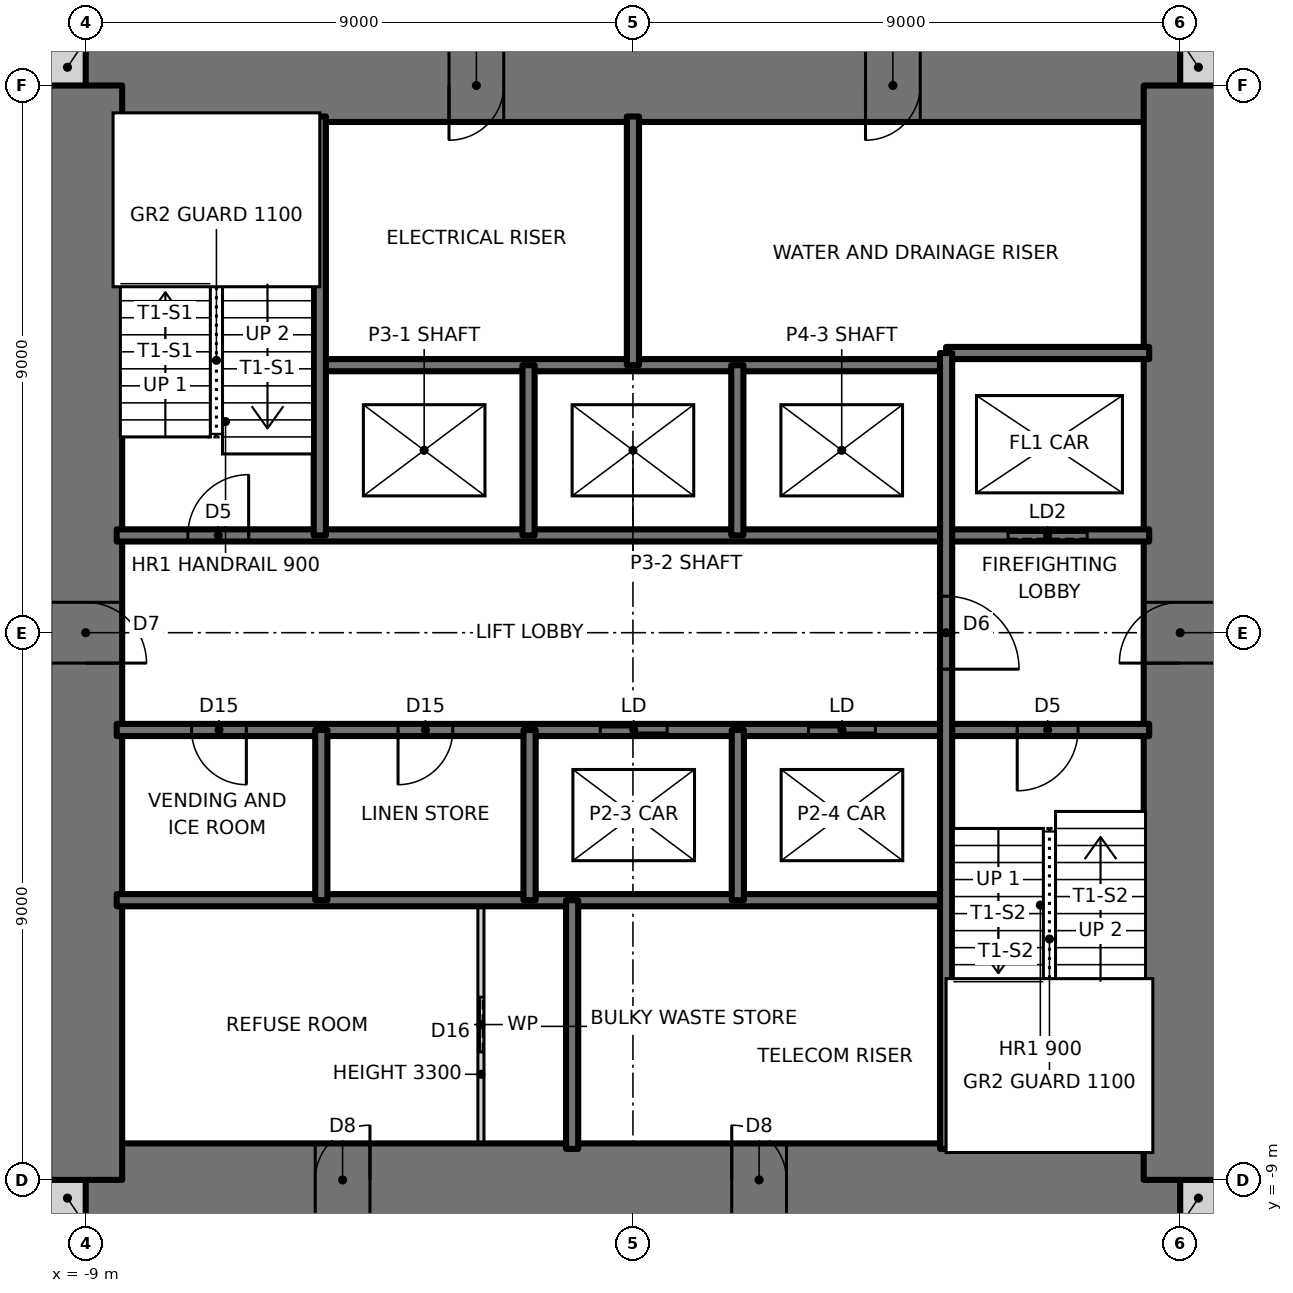
"""IFC4 building model, lengths in metres.
Left out: names, types, materials, properties, quantities, classifications, styles, units other than length and angle.
Written with IfcOpenShell. Run it as: python <this file> out.ifc"""

import sys

from ifc_helpers import new_model, si_unit, direction, frame, frame_2d, origin, place, context, subcontext, project, spatial, rectangle, extrude, element, fill, save


model = new_model("IFC4")
c1 = context("Model", 3, precision=1e-05, world=origin(), true_north=direction((0.0, 1.0)))
c2 = subcontext(c1, "Body", "Model", "MODEL_VIEW")
j1 = project(units=[si_unit("LENGTHUNIT", "METRE"), si_unit("PLANEANGLEUNIT", "RADIAN")], contexts=[c1])
p1 = place(None, origin())
s1 = spatial("IfcSite", under=j1, at=p1, CompositionType="ELEMENT")
p2 = place(p1, origin())
s2 = spatial("IfcBuilding", under=s1, at=p2, CompositionType="ELEMENT")
p3 = place(p2, frame((0.0, 0.0, 87.5)))
s3 = spatial("IfcBuildingStorey", under=s2, at=p3, CompositionType="ELEMENT", Elevation=87.5)
for number, where, z_axis, x_axis in (
    (1, (-9.6, -9.3, 0.0), (0.0, 0.0, 1.0), (1.0, 0.0, 0.0)),
    (2, (9.0, -9.3, 0.0), (0.0, 0.0, 1.0), (1.0, 0.0, 0.0)),
    (3, (9.0, 9.3, 0.0), (0.0, 0.0, 1.0), (1.0, 0.0, 0.0)),
    (4, (-9.6, 9.3, 0.0), (0.0, 0.0, 1.0), (1.0, 0.0, 0.0)),
):
    element("IfcWall", number, at=place(p3, frame(where, z_axis=z_axis, x_axis=x_axis)), inside=s3, PredefinedType="SOLIDWALL", context=c2, shape_type="SweptSolid", body=[
        extrude(rectangle(XDim=0.6, YDim=0.6, at=frame_2d((0.3, 0.0))), origin(), (0.0, 0.0, 1.0), 3.5),
    ])
p4 = place(p3, frame((-9.0, -9.0, 0.0), z_axis=(0.0, 0.0, 1.0), x_axis=(1.0, 0.0, 0.0)))
e5 = element("IfcWall", 5, at=p4, inside=s3, PredefinedType="SHEAR", context=c2, shape_type="SweptSolid", body=[
    extrude(rectangle(XDim=18.0, YDim=1.2, at=frame_2d((9.0, 0.0))), origin(), (0.0, 0.0, 1.0), 3.5),
])
p5 = place(p4, frame((3.775, 0.0, 0.0)))
e6 = element("IfcOpeningElement", 6, at=p5, cuts=e5, PredefinedType="OPENING", context=c2, shape_type="SweptSolid", body=[
    extrude(rectangle(XDim=0.9, YDim=2.1, at=frame_2d((0.45, 1.05))), frame((0.0, 0.61, 0.0), z_axis=(0.0, -1.0, 0.0), x_axis=(1.0, 0.0, 0.0)), (0.0, 0.0, 1.0), 1.22),
])
p6 = place(p4, frame((10.625, 0.0, 0.0)))
e7 = element("IfcOpeningElement", 7, at=p6, cuts=e5, PredefinedType="OPENING", context=c2, shape_type="SweptSolid", body=[
    extrude(rectangle(XDim=0.9, YDim=2.1, at=frame_2d((0.45, 1.05))), frame((0.0, 0.61, 0.0), z_axis=(0.0, -1.0, 0.0), x_axis=(1.0, 0.0, 0.0)), (0.0, 0.0, 1.0), 1.22),
])
p7 = place(p3, frame((9.0, 9.0, 0.0), z_axis=(0.0, 0.0, 1.0), x_axis=(-1.0, 0.0, 0.0)))
e8 = element("IfcWall", 8, at=p7, inside=s3, PredefinedType="SHEAR", context=c2, shape_type="SweptSolid", body=[
    extrude(rectangle(XDim=18.0, YDim=1.2, at=frame_2d((9.0, 0.0))), origin(), (0.0, 0.0, 1.0), 3.5),
])
p8 = place(p7, frame((11.125, 0.0, 0.0)))
e9 = element("IfcOpeningElement", 9, at=p8, cuts=e8, PredefinedType="OPENING", context=c2, shape_type="SweptSolid", body=[
    extrude(rectangle(XDim=0.9, YDim=2.1, at=frame_2d((0.45, 1.05))), frame((0.0, 0.61, 0.0), z_axis=(0.0, -1.0, 0.0), x_axis=(1.0, 0.0, 0.0)), (0.0, 0.0, 1.0), 1.22),
])
p9 = place(p7, frame((4.275, 0.0, 0.0)))
e10 = element("IfcOpeningElement", 10, at=p9, cuts=e8, PredefinedType="OPENING", context=c2, shape_type="SweptSolid", body=[
    extrude(rectangle(XDim=0.9, YDim=2.1, at=frame_2d((0.45, 1.05))), frame((0.0, 0.61, 0.0), z_axis=(0.0, -1.0, 0.0), x_axis=(1.0, 0.0, 0.0)), (0.0, 0.0, 1.0), 1.22),
])
p10 = place(p3, frame((9.0, -9.0, 0.0), z_axis=(0.0, 0.0, 1.0), x_axis=(0.0, 1.0, 0.0)))
e11 = element("IfcWall", 11, at=p10, inside=s3, PredefinedType="SHEAR", context=c2, shape_type="SweptSolid", body=[
    extrude(rectangle(XDim=18.0, YDim=1.2, at=frame_2d((9.0, 0.0))), origin(), (0.0, 0.0, 1.0), 3.5),
])
p11 = place(p10, frame((8.5, 0.0, 0.0)))
e12 = element("IfcOpeningElement", 12, at=p11, cuts=e11, PredefinedType="OPENING", context=c2, shape_type="SweptSolid", body=[
    extrude(rectangle(XDim=1.0, YDim=2.1, at=frame_2d((0.5, 1.05))), frame((0.0, 0.61, 0.0), z_axis=(0.0, -1.0, 0.0), x_axis=(1.0, 0.0, 0.0)), (0.0, 0.0, 1.0), 1.22),
])
p12 = place(p3, frame((-9.0, 9.0, 0.0), z_axis=(0.0, 0.0, 1.0), x_axis=(0.0, -1.0, 0.0)))
e13 = element("IfcWall", 13, at=p12, inside=s3, PredefinedType="SHEAR", context=c2, shape_type="SweptSolid", body=[
    extrude(rectangle(XDim=18.0, YDim=1.2, at=frame_2d((9.0, 0.0))), origin(), (0.0, 0.0, 1.0), 3.5),
])
p13 = place(p12, frame((8.5, 0.0, 0.0)))
e14 = element("IfcOpeningElement", 14, at=p13, cuts=e13, PredefinedType="OPENING", context=c2, shape_type="SweptSolid", body=[
    extrude(rectangle(XDim=1.0, YDim=2.1, at=frame_2d((0.5, 1.05))), frame((0.0, 0.61, 0.0), z_axis=(0.0, -1.0, 0.0), x_axis=(1.0, 0.0, 0.0)), (0.0, 0.0, 1.0), 1.22),
])
p14 = place(p3, frame((-8.49, -4.4, 0.0), z_axis=(0.0, 0.0, 1.0), x_axis=(1.0, 0.0, 0.0)))
e15 = element("IfcWall", 15, at=p14, inside=s3, PredefinedType="SOLIDWALL", context=c2, shape_type="SweptSolid", body=[
    extrude(rectangle(XDim=13.64, YDim=0.2, at=frame_2d((6.82, 0.0))), origin(), (0.0, 0.0, 1.0), 3.5),
])
p15 = place(p3, frame((-8.49, -1.6, 0.0), z_axis=(0.0, 0.0, 1.0), x_axis=(1.0, 0.0, 0.0)))
e16 = element("IfcWall", 16, at=p15, inside=s3, PredefinedType="SOLIDWALL", context=c2, shape_type="SweptSolid", body=[
    extrude(rectangle(XDim=16.98, YDim=0.2, at=frame_2d((8.49, 0.0))), origin(), (0.0, 0.0, 1.0), 3.5),
])
p16 = place(p15, frame((14.81, 0.0, 0.0)))
e17 = element("IfcOpeningElement", 17, at=p16, cuts=e16, PredefinedType="OPENING", context=c2, shape_type="SweptSolid", body=[
    extrude(rectangle(XDim=1.0, YDim=2.1, at=frame_2d((0.5, 1.05))), frame((0.0, 0.11, 0.0), z_axis=(0.0, -1.0, 0.0), x_axis=(1.0, 0.0, 0.0)), (0.0, 0.0, 1.0), 0.22),
])
p17 = place(p15, frame((1.232, 0.0, 0.0)))
e18 = element("IfcOpeningElement", 18, at=p17, cuts=e16, PredefinedType="OPENING", context=c2, shape_type="SweptSolid", body=[
    extrude(rectangle(XDim=0.9, YDim=2.1, at=frame_2d((0.45, 1.05))), frame((0.0, 0.11, 0.0), z_axis=(0.0, -1.0, 0.0), x_axis=(1.0, 0.0, 0.0)), (0.0, 0.0, 1.0), 0.22),
])
p18 = place(p15, frame((4.627, 0.0, 0.0)))
e19 = element("IfcOpeningElement", 19, at=p18, cuts=e16, PredefinedType="OPENING", context=c2, shape_type="SweptSolid", body=[
    extrude(rectangle(XDim=0.9, YDim=2.1, at=frame_2d((0.45, 1.05))), frame((0.0, 0.11, 0.0), z_axis=(0.0, -1.0, 0.0), x_axis=(1.0, 0.0, 0.0)), (0.0, 0.0, 1.0), 0.22),
])
p19 = place(p15, frame((7.953, 0.0, 0.0)))
e20 = element("IfcOpeningElement", 20, at=p19, cuts=e16, PredefinedType="OPENING", context=c2, shape_type="SweptSolid", body=[
    extrude(rectangle(XDim=1.1, YDim=2.1, at=frame_2d((0.55, 1.05))), frame((0.0, 0.11, 0.0), z_axis=(0.0, -1.0, 0.0), x_axis=(1.0, 0.0, 0.0)), (0.0, 0.0, 1.0), 0.22),
])
p20 = place(p15, frame((11.378, 0.0, 0.0)))
e21 = element("IfcOpeningElement", 21, at=p20, cuts=e16, PredefinedType="OPENING", context=c2, shape_type="SweptSolid", body=[
    extrude(rectangle(XDim=1.1, YDim=2.1, at=frame_2d((0.55, 1.05))), frame((0.0, 0.11, 0.0), z_axis=(0.0, -1.0, 0.0), x_axis=(1.0, 0.0, 0.0)), (0.0, 0.0, 1.0), 0.22),
])
p21 = place(p3, frame((-8.49, 1.6, 0.0), z_axis=(0.0, 0.0, 1.0), x_axis=(1.0, 0.0, 0.0)))
e22 = element("IfcWall", 22, at=p21, inside=s3, PredefinedType="SOLIDWALL", context=c2, shape_type="SweptSolid", body=[
    extrude(rectangle(XDim=16.98, YDim=0.2, at=frame_2d((8.49, 0.0))), origin(), (0.0, 0.0, 1.0), 3.5),
])
p22 = place(p21, frame((1.17, 0.0, 0.0)))
e23 = element("IfcOpeningElement", 23, at=p22, cuts=e22, PredefinedType="OPENING", context=c2, shape_type="SweptSolid", body=[
    extrude(rectangle(XDim=1.0, YDim=2.1, at=frame_2d((0.5, 1.05))), frame((0.0, 0.11, 0.0), z_axis=(0.0, -1.0, 0.0), x_axis=(1.0, 0.0, 0.0)), (0.0, 0.0, 1.0), 0.22),
])
p23 = place(p21, frame((14.66, 0.0, 0.0)))
e24 = element("IfcOpeningElement", 24, at=p23, cuts=e22, PredefinedType="OPENING", context=c2, shape_type="SweptSolid", body=[
    extrude(rectangle(XDim=1.3, YDim=2.1, at=frame_2d((0.65, 1.05))), frame((0.0, 0.11, 0.0), z_axis=(0.0, -1.0, 0.0), x_axis=(1.0, 0.0, 0.0)), (0.0, 0.0, 1.0), 0.22),
])
p24 = place(p3, frame((-5.15, 4.4, 0.0), z_axis=(0.0, 0.0, 1.0), x_axis=(1.0, 0.0, 0.0)))
e25 = element("IfcWall", 25, at=p24, inside=s3, PredefinedType="SOLIDWALL", context=c2, shape_type="SweptSolid", body=[
    extrude(rectangle(XDim=10.3, YDim=0.2, at=frame_2d((5.15, 0.0))), origin(), (0.0, 0.0, 1.0), 3.5),
])
p25 = place(p3, frame((5.15, 4.6, 0.0), z_axis=(0.0, 0.0, 1.0), x_axis=(1.0, 0.0, 0.0)))
e26 = element("IfcWall", 26, at=p25, inside=s3, PredefinedType="SOLIDWALL", context=c2, shape_type="SweptSolid", body=[
    extrude(rectangle(XDim=3.34, YDim=0.2, at=frame_2d((1.67, 0.0))), origin(), (0.0, 0.0, 1.0), 3.5),
])
p26 = place(p3, frame((5.15, -8.49, 0.0), z_axis=(0.0, 0.0, 1.0), x_axis=(0.0, 1.0, 0.0)))
e27 = element("IfcWall", 27, at=p26, inside=s3, PredefinedType="SOLIDWALL", context=c2, shape_type="SweptSolid", body=[
    extrude(rectangle(XDim=13.09, YDim=0.2, at=frame_2d((6.545, 0.0))), origin(), (0.0, 0.0, 1.0), 3.5),
])
p27 = place(p26, frame((7.89, 0.0, 0.0)))
e28 = element("IfcOpeningElement", 28, at=p27, cuts=e27, PredefinedType="OPENING", context=c2, shape_type="SweptSolid", body=[
    extrude(rectangle(XDim=1.2, YDim=2.1, at=frame_2d((0.6, 1.05))), frame((0.0, 0.11, 0.0), z_axis=(0.0, -1.0, 0.0), x_axis=(1.0, 0.0, 0.0)), (0.0, 0.0, 1.0), 0.22),
])
for number, where, z_axis, x_axis in (
    (29, (1.725, -4.4, 0.0), (0.0, 0.0, 1.0), (0.0, 1.0, 0.0)),
    (30, (1.717, 1.6, 0.0), (0.0, 0.0, 1.0), (0.0, 1.0, 0.0)),
):
    element("IfcWall", number, at=place(p3, frame(where, z_axis=z_axis, x_axis=x_axis)), inside=s3, PredefinedType="SOLIDWALL", context=c2, shape_type="SweptSolid", body=[
        extrude(rectangle(XDim=2.8, YDim=0.2, at=frame_2d((1.4, 0.0))), origin(), (0.0, 0.0, 1.0), 3.5),
    ])
for number, where, z_axis, x_axis in (
    (31, (0.0, 4.4, 0.0), (0.0, 0.0, 1.0), (0.0, 1.0, 0.0)),
    (32, (-1.0, -8.49, 0.0), (0.0, 0.0, 1.0), (0.0, 1.0, 0.0)),
):
    element("IfcWall", number, at=place(p3, frame(where, z_axis=z_axis, x_axis=x_axis)), inside=s3, PredefinedType="SOLIDWALL", context=c2, shape_type="SweptSolid", body=[
        extrude(rectangle(XDim=4.09, YDim=0.2, at=frame_2d((2.045, 0.0))), origin(), (0.0, 0.0, 1.0), 3.5),
    ])
for number, where, z_axis, x_axis in (
    (33, (-1.7, -4.4, 0.0), (0.0, 0.0, 1.0), (0.0, 1.0, 0.0)),
    (34, (-1.717, 1.6, 0.0), (0.0, 0.0, 1.0), (0.0, 1.0, 0.0)),
):
    element("IfcWall", number, at=place(p3, frame(where, z_axis=z_axis, x_axis=x_axis)), inside=s3, PredefinedType="SOLIDWALL", context=c2, shape_type="SweptSolid", body=[
        extrude(rectangle(XDim=2.8, YDim=0.2, at=frame_2d((1.4, 0.0))), origin(), (0.0, 0.0, 1.0), 3.5),
    ])
p28 = place(p3, frame((-2.5, -8.49, 0.0), z_axis=(0.0, 0.0, 1.0), x_axis=(0.0, 1.0, 0.0)))
e35 = element("IfcWall", 35, at=p28, inside=s3, PredefinedType="PARTITIONING", context=c2, shape_type="SweptSolid", body=[
    extrude(rectangle(XDim=4.09, YDim=0.1, at=frame_2d((2.045, 0.0))), origin(), (0.0, 0.0, 1.0), 3.3),
])
p29 = place(p28, frame((1.595, 0.0, 0.0)))
e36 = element("IfcOpeningElement", 36, at=p29, cuts=e35, PredefinedType="OPENING", context=c2, shape_type="SweptSolid", body=[
    extrude(rectangle(XDim=0.9, YDim=2.1, at=frame_2d((0.45, 1.05))), frame((0.0, 0.06, 0.0), z_axis=(0.0, -1.0, 0.0), x_axis=(1.0, 0.0, 0.0)), (0.0, 0.0, 1.0), 0.12),
])
p30 = place(p3, frame((-5.125, -4.4, 0.0), z_axis=(0.0, 0.0, 1.0), x_axis=(0.0, 1.0, 0.0)))
e37 = element("IfcWall", 37, at=p30, inside=s3, PredefinedType="SOLIDWALL", context=c2, shape_type="SweptSolid", body=[
    extrude(rectangle(XDim=2.8, YDim=0.2, at=frame_2d((1.4, 0.0))), origin(), (0.0, 0.0, 1.0), 3.5),
])
p31 = place(p3, frame((-5.15, 1.6, 0.0), z_axis=(0.0, 0.0, 1.0), x_axis=(0.0, 1.0, 0.0)))
e38 = element("IfcWall", 38, at=p31, inside=s3, PredefinedType="SOLIDWALL", context=c2, shape_type="SweptSolid", body=[
    extrude(rectangle(XDim=6.89, YDim=0.2, at=frame_2d((3.445, 0.0))), origin(), (0.0, 0.0, 1.0), 3.5),
])
p32 = place(p22, origin())
e39 = element("IfcDoor", 39, at=p32, inside=s3, OperationType="SINGLE_SWING_RIGHT", PredefinedType="DOOR", context=c2, shape_type="SweptSolid", body=[
    extrude(rectangle(XDim=1.0, YDim=2.1, at=frame_2d((0.5, 1.05))), frame((0.0, 0.025, 0.0), z_axis=(0.0, -1.0, 0.0), x_axis=(1.0, 0.0, 0.0)), (0.0, 0.0, 1.0), 0.05),
])
fill(e23, e39)
p33 = place(p16, frame((1.0, 0.0, 0.0), z_axis=(0.0, 0.0, 1.0), x_axis=(-1.0, 0.0, 0.0)))
e40 = element("IfcDoor", 40, at=p33, inside=s3, OperationType="SINGLE_SWING_RIGHT", PredefinedType="DOOR", context=c2, shape_type="SweptSolid", body=[
    extrude(rectangle(XDim=1.0, YDim=2.1, at=frame_2d((0.5, 1.05))), frame((0.0, 0.025, 0.0), z_axis=(0.0, -1.0, 0.0), x_axis=(1.0, 0.0, 0.0)), (0.0, 0.0, 1.0), 0.05),
])
fill(e17, e40)
p34 = place(p27, frame((1.2, 0.0, 0.0), z_axis=(0.0, 0.0, 1.0), x_axis=(-1.0, 0.0, 0.0)))
e41 = element("IfcDoor", 41, at=p34, inside=s3, OperationType="SINGLE_SWING_RIGHT", PredefinedType="DOOR", context=c2, shape_type="SweptSolid", body=[
    extrude(rectangle(XDim=1.2, YDim=2.1, at=frame_2d((0.6, 1.05))), frame((0.0, 0.025, 0.0), z_axis=(0.0, -1.0, 0.0), x_axis=(1.0, 0.0, 0.0)), (0.0, 0.0, 1.0), 0.05),
])
fill(e28, e41)
p35 = place(p17, frame((0.9, 0.0, 0.0), z_axis=(0.0, 0.0, 1.0), x_axis=(-1.0, 0.0, 0.0)))
e42 = element("IfcDoor", 42, at=p35, inside=s3, OperationType="SINGLE_SWING_LEFT", PredefinedType="DOOR", context=c2, shape_type="SweptSolid", body=[
    extrude(rectangle(XDim=0.9, YDim=2.1, at=frame_2d((0.45, 1.05))), frame((0.0, 0.025, 0.0), z_axis=(0.0, -1.0, 0.0), x_axis=(1.0, 0.0, 0.0)), (0.0, 0.0, 1.0), 0.05),
])
fill(e18, e42)
p36 = place(p18, frame((0.9, 0.0, 0.0), z_axis=(0.0, 0.0, 1.0), x_axis=(-1.0, 0.0, 0.0)))
e43 = element("IfcDoor", 43, at=p36, inside=s3, OperationType="SINGLE_SWING_RIGHT", PredefinedType="DOOR", context=c2, shape_type="SweptSolid", body=[
    extrude(rectangle(XDim=0.9, YDim=2.1, at=frame_2d((0.45, 1.05))), frame((0.0, 0.025, 0.0), z_axis=(0.0, -1.0, 0.0), x_axis=(1.0, 0.0, 0.0)), (0.0, 0.0, 1.0), 0.05),
])
fill(e19, e43)
p37 = place(p29, origin())
e44 = element("IfcDoor", 44, at=p37, inside=s3, OperationType="SLIDING_TO_LEFT", PredefinedType="DOOR", context=c2, shape_type="SweptSolid", body=[
    extrude(rectangle(XDim=0.9, YDim=2.1, at=frame_2d((0.45, 1.05))), frame((0.0, 0.025, 0.0), z_axis=(0.0, -1.0, 0.0), x_axis=(1.0, 0.0, 0.0)), (0.0, 0.0, 1.0), 0.05),
])
fill(e36, e44)
p38 = place(p13, origin())
e45 = element("IfcDoor", 45, at=p38, inside=s3, OperationType="SINGLE_SWING_RIGHT", PredefinedType="DOOR", context=c2, shape_type="SweptSolid", body=[
    extrude(rectangle(XDim=1.0, YDim=2.1, at=frame_2d((0.5, 1.05))), frame((0.0, 0.025, 0.0), z_axis=(0.0, -1.0, 0.0), x_axis=(1.0, 0.0, 0.0)), (0.0, 0.0, 1.0), 0.05),
])
fill(e14, e45)
p39 = place(p11, origin())
e46 = element("IfcDoor", 46, at=p39, inside=s3, OperationType="SINGLE_SWING_LEFT", PredefinedType="DOOR", context=c2, shape_type="SweptSolid", body=[
    extrude(rectangle(XDim=1.0, YDim=2.1, at=frame_2d((0.5, 1.05))), frame((0.0, 0.025, 0.0), z_axis=(0.0, -1.0, 0.0), x_axis=(1.0, 0.0, 0.0)), (0.0, 0.0, 1.0), 0.05),
])
fill(e12, e46)
p40 = place(p8, origin())
e47 = element("IfcDoor", 47, at=p40, inside=s3, OperationType="SINGLE_SWING_RIGHT", PredefinedType="DOOR", context=c2, shape_type="SweptSolid", body=[
    extrude(rectangle(XDim=0.9, YDim=2.1, at=frame_2d((0.45, 1.05))), frame((0.0, 0.025, 0.0), z_axis=(0.0, -1.0, 0.0), x_axis=(1.0, 0.0, 0.0)), (0.0, 0.0, 1.0), 0.05),
])
fill(e9, e47)
p41 = place(p9, origin())
e48 = element("IfcDoor", 48, at=p41, inside=s3, OperationType="SINGLE_SWING_RIGHT", PredefinedType="DOOR", context=c2, shape_type="SweptSolid", body=[
    extrude(rectangle(XDim=0.9, YDim=2.1, at=frame_2d((0.45, 1.05))), frame((0.0, 0.025, 0.0), z_axis=(0.0, -1.0, 0.0), x_axis=(1.0, 0.0, 0.0)), (0.0, 0.0, 1.0), 0.05),
])
fill(e10, e48)
p42 = place(p5, origin())
e49 = element("IfcDoor", 49, at=p42, inside=s3, OperationType="SINGLE_SWING_RIGHT", PredefinedType="DOOR", context=c2, shape_type="SweptSolid", body=[
    extrude(rectangle(XDim=0.9, YDim=2.1, at=frame_2d((0.45, 1.05))), frame((0.0, 0.025, 0.0), z_axis=(0.0, -1.0, 0.0), x_axis=(1.0, 0.0, 0.0)), (0.0, 0.0, 1.0), 0.05),
])
fill(e6, e49)
p43 = place(p6, origin())
e50 = element("IfcDoor", 50, at=p43, inside=s3, OperationType="SINGLE_SWING_LEFT", PredefinedType="DOOR", context=c2, shape_type="SweptSolid", body=[
    extrude(rectangle(XDim=0.9, YDim=2.1, at=frame_2d((0.45, 1.05))), frame((0.0, 0.025, 0.0), z_axis=(0.0, -1.0, 0.0), x_axis=(1.0, 0.0, 0.0)), (0.0, 0.0, 1.0), 0.05),
])
fill(e7, e50)
p44 = place(p19, origin())
e51 = element("IfcDoor", 51, at=p44, inside=s3, OperationType="DOUBLE_DOOR_SLIDING", PredefinedType="DOOR", context=c2, shape_type="SweptSolid", body=[
    extrude(rectangle(XDim=1.1, YDim=2.1, at=frame_2d((0.55, 1.05))), frame((0.0, 0.025, 0.0), z_axis=(0.0, -1.0, 0.0), x_axis=(1.0, 0.0, 0.0)), (0.0, 0.0, 1.0), 0.05),
])
fill(e20, e51)
p45 = place(p20, origin())
e52 = element("IfcDoor", 52, at=p45, inside=s3, OperationType="DOUBLE_DOOR_SLIDING", PredefinedType="DOOR", context=c2, shape_type="SweptSolid", body=[
    extrude(rectangle(XDim=1.1, YDim=2.1, at=frame_2d((0.55, 1.05))), frame((0.0, 0.025, 0.0), z_axis=(0.0, -1.0, 0.0), x_axis=(1.0, 0.0, 0.0)), (0.0, 0.0, 1.0), 0.05),
])
fill(e21, e52)
p46 = place(p23, origin())
e53 = element("IfcDoor", 53, at=p46, inside=s3, OperationType="SLIDING_TO_LEFT", PredefinedType="DOOR", context=c2, shape_type="SweptSolid", body=[
    extrude(rectangle(XDim=1.3, YDim=2.1, at=frame_2d((0.65, 1.05))), frame((0.0, 0.025, 0.0), z_axis=(0.0, -1.0, 0.0), x_axis=(1.0, 0.0, 0.0)), (0.0, 0.0, 1.0), 0.05),
])
fill(e24, e53)
save(model, sys.argv[1])
